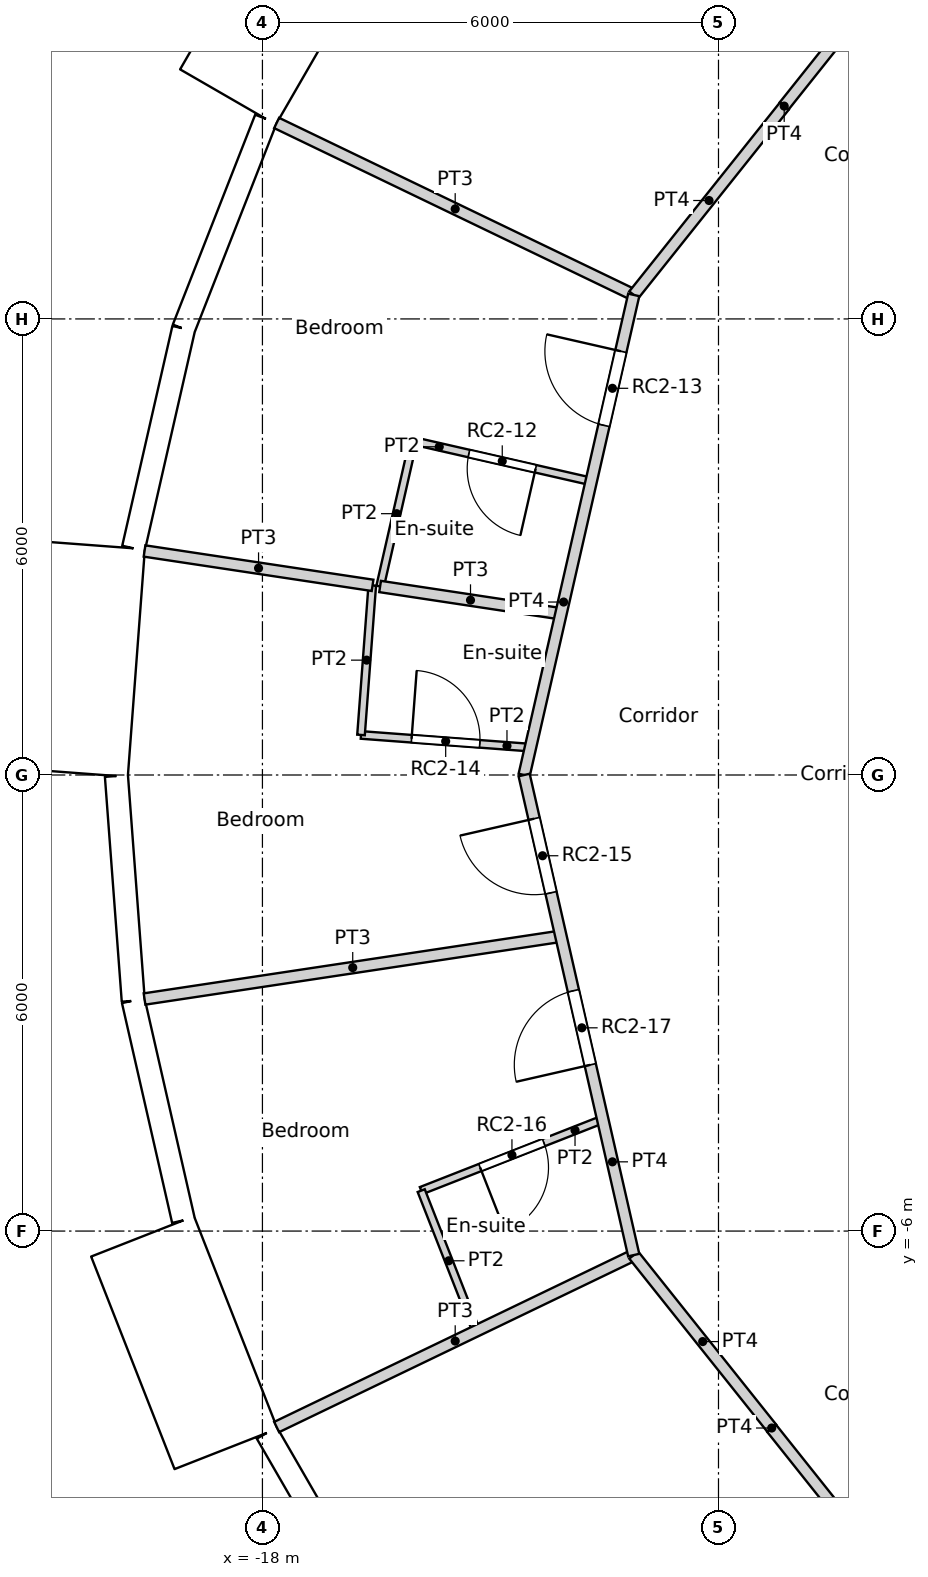
"""IFC4 building model, lengths in metres.
Left out: names, types, materials, properties, quantities, classifications, styles, units other than length and angle.
Written with IfcOpenShell. Run it as: python <this file> out.ifc"""

import sys

from ifc_helpers import new_model, si_unit, direction, frame, frame_2d, origin, origin_2d, place, context, subcontext, project, spatial, rectangle, circle, extrude, element, fill, save


model = new_model("IFC4")
c1 = context("Model", 3, precision=1e-05, world=origin(), true_north=direction((0.0, 1.0)))
c2 = subcontext(c1, "Body", "Model", "MODEL_VIEW")
j1 = project(units=[si_unit("LENGTHUNIT", "METRE"), si_unit("PLANEANGLEUNIT", "RADIAN")], contexts=[c1])
p1 = place(None, origin())
s1 = spatial("IfcSite", under=j1, at=p1, CompositionType="ELEMENT")
p2 = place(p1, origin())
s2 = spatial("IfcBuilding", under=s1, at=p2, CompositionType="ELEMENT")
p3 = place(p2, frame((0.0, 0.0, 241.8)))
s3 = spatial("IfcBuildingStorey", under=s2, at=p3, CompositionType="ELEMENT", Elevation=241.8)
for number, where, z_axis, x_axis in (
    (1, (-16.958, 8.167, 0.0), (0.0, 0.0, 1.0), (1.0, 0.0, 0.0)),
    (2, (-18.612, 2.805, 0.0), (0.0, 0.0, 1.0), (1.0, 0.0, 0.0)),
    (3, (-18.612, -2.805, 0.0), (0.0, 0.0, 1.0), (1.0, 0.0, 0.0)),
    (4, (-16.958, -8.167, 0.0), (0.0, 0.0, 1.0), (1.0, 0.0, 0.0)),
):
    element("IfcColumn", number, at=place(p3, frame(where, z_axis=z_axis, x_axis=x_axis)), inside=s3, PredefinedType="COLUMN", context=c2, shape_type="SweptSolid", body=[
        extrude(circle(Radius=0.55, at=origin_2d()), origin(), (0.0, 0.0, 1.0), 3.6),
    ])
p4 = place(p3, frame((-16.952, 11.52, -0.35), z_axis=(0.0, 0.0, 1.0), x_axis=(-0.499990139034, -0.866031096941, 0.0)))
e5 = element("IfcWall", 5, at=p4, inside=s3, PredefinedType="ELEMENTEDWALL", context=c2, shape_type="SweptSolid", body=[
    extrude(rectangle(XDim=3.0, YDim=1.45, at=frame_2d((1.5, 0.0))), origin(), (0.0, 0.0, 1.0), 3.6),
])
p5 = place(p4, frame((1.5, 0.0, 1.9)))
e6 = element("IfcOpeningElement", 6, at=p5, cuts=e5, PredefinedType="OPENING", context=c2, shape_type="SweptSolid", body=[
    extrude(circle(Radius=0.9, at=origin_2d()), frame((0.0, 0.735, 0.0), z_axis=(0.0, -1.0, 0.0), x_axis=(1.0, 0.0, 0.0)), (0.0, 0.0, 1.0), 1.47),
])
p6 = place(p3, frame((-17.955, 8.629, 0.0), z_axis=(0.0, 0.0, 1.0), x_axis=(-0.36530043032, -0.930889679612, 0.0)))
e7 = element("IfcWall", 7, at=p6, inside=s3, PredefinedType="SOLIDWALL", context=c2, shape_type="SweptSolid", body=[
    extrude(rectangle(XDim=2.962, YDim=0.3, at=frame_2d((1.481, 0.0))), origin(), (0.0, 0.0, 1.0), 3.25),
])
p7 = place(p6, frame((1.481, 0.0, 1.55)))
e8 = element("IfcOpeningElement", 8, at=p7, cuts=e7, PredefinedType="OPENING", context=c2, shape_type="SweptSolid", body=[
    extrude(circle(Radius=0.9, at=origin_2d()), frame((0.0, 0.16, 0.0), z_axis=(0.0, -1.0, 0.0), x_axis=(1.0, 0.0, 0.0)), (0.0, 0.0, 1.0), 0.32),
])
p8 = place(p3, frame((-19.037, 5.872, 0.0), z_axis=(0.0, 0.0, 1.0), x_axis=(-0.222529389789, -0.974925982155, 0.0)))
e9 = element("IfcWall", 9, at=p8, inside=s3, PredefinedType="SOLIDWALL", context=c2, shape_type="SweptSolid", body=[
    extrude(rectangle(XDim=2.962, YDim=0.3, at=frame_2d((1.481, 0.0))), origin(), (0.0, 0.0, 1.0), 3.25),
])
p9 = place(p8, frame((1.481, 0.0, 1.55)))
e10 = element("IfcOpeningElement", 10, at=p9, cuts=e9, PredefinedType="OPENING", context=c2, shape_type="SweptSolid", body=[
    extrude(circle(Radius=0.9, at=origin_2d()), frame((0.0, 0.16, 0.0), z_axis=(0.0, -1.0, 0.0), x_axis=(1.0, 0.0, 0.0)), (0.0, 0.0, 1.0), 0.32),
])
p10 = place(p3, frame((-20.272, 3.023, -0.35), z_axis=(0.0, 0.0, 1.0), x_axis=(-0.074785902127, -0.997199613339, 0.0)))
e11 = element("IfcWall", 11, at=p10, inside=s3, PredefinedType="ELEMENTEDWALL", context=c2, shape_type="SweptSolid", body=[
    extrude(rectangle(XDim=3.0, YDim=1.45, at=frame_2d((1.5, 0.0))), origin(), (0.0, 0.0, 1.0), 3.6),
])
p11 = place(p10, frame((1.5, 0.0, 1.9)))
e12 = element("IfcOpeningElement", 12, at=p11, cuts=e11, PredefinedType="OPENING", context=c2, shape_type="SweptSolid", body=[
    extrude(circle(Radius=0.9, at=origin_2d()), frame((0.0, 0.735, 0.0), z_axis=(0.0, -1.0, 0.0), x_axis=(1.0, 0.0, 0.0)), (0.0, 0.0, 1.0), 1.47),
])
p12 = place(p3, frame((-19.921, -0.015, 0.0), z_axis=(0.0, 0.0, 1.0), x_axis=(0.07474897196, -0.997202382263, 0.0)))
e13 = element("IfcWall", 13, at=p12, inside=s3, PredefinedType="SOLIDWALL", context=c2, shape_type="SweptSolid", body=[
    extrude(rectangle(XDim=2.962, YDim=0.3, at=frame_2d((1.481, 0.0))), origin(), (0.0, 0.0, 1.0), 3.25),
])
p13 = place(p12, frame((1.481, 0.0, 1.55)))
e14 = element("IfcOpeningElement", 14, at=p13, cuts=e13, PredefinedType="OPENING", context=c2, shape_type="SweptSolid", body=[
    extrude(circle(Radius=0.9, at=origin_2d()), frame((0.0, 0.16, 0.0), z_axis=(0.0, -1.0, 0.0), x_axis=(1.0, 0.0, 0.0)), (0.0, 0.0, 1.0), 0.32),
])
p14 = place(p3, frame((-19.699, -2.969, 0.0), z_axis=(0.0, 0.0, 1.0), x_axis=(0.222529389789, -0.974925982155, 0.0)))
e15 = element("IfcWall", 15, at=p14, inside=s3, PredefinedType="SOLIDWALL", context=c2, shape_type="SweptSolid", body=[
    extrude(rectangle(XDim=2.962, YDim=0.3, at=frame_2d((1.481, 0.0))), origin(), (0.0, 0.0, 1.0), 3.25),
])
p15 = place(p14, frame((1.481, 0.0, 1.55)))
e16 = element("IfcOpeningElement", 16, at=p15, cuts=e15, PredefinedType="OPENING", context=c2, shape_type="SweptSolid", body=[
    extrude(circle(Radius=0.9, at=origin_2d()), frame((0.0, 0.16, 0.0), z_axis=(0.0, -1.0, 0.0), x_axis=(1.0, 0.0, 0.0)), (0.0, 0.0, 1.0), 0.32),
])
p16 = place(p3, frame((-19.576, -6.072, -0.35), z_axis=(0.0, 0.0, 1.0), x_axis=(0.36537792632, -0.93085926485, 0.0)))
e17 = element("IfcWall", 17, at=p16, inside=s3, PredefinedType="ELEMENTEDWALL", context=c2, shape_type="SweptSolid", body=[
    extrude(rectangle(XDim=3.0, YDim=1.45, at=frame_2d((1.5, 0.0))), origin(), (0.0, 0.0, 1.0), 3.6),
])
p17 = place(p16, frame((1.5, 0.0, 1.9)))
e18 = element("IfcOpeningElement", 18, at=p17, cuts=e17, PredefinedType="OPENING", context=c2, shape_type="SweptSolid", body=[
    extrude(circle(Radius=0.9, at=origin_2d()), frame((0.0, 0.735, 0.0), z_axis=(0.0, -1.0, 0.0), x_axis=(1.0, 0.0, 0.0)), (0.0, 0.0, 1.0), 1.47),
])
p18 = place(p3, frame((-17.941, -8.657, 0.0), z_axis=(0.0, 0.0, 1.0), x_axis=(0.499950756475, -0.86605383268, 0.0)))
e19 = element("IfcWall", 19, at=p18, inside=s3, PredefinedType="SOLIDWALL", context=c2, shape_type="SweptSolid", body=[
    extrude(rectangle(XDim=2.962, YDim=0.3, at=frame_2d((1.481, 0.0))), origin(), (0.0, 0.0, 1.0), 3.25),
])
p19 = place(p18, frame((1.481, 0.0, 1.55)))
e20 = element("IfcOpeningElement", 20, at=p19, cuts=e19, PredefinedType="OPENING", context=c2, shape_type="SweptSolid", body=[
    extrude(circle(Radius=0.9, at=origin_2d()), frame((0.0, 0.16, 0.0), z_axis=(0.0, -1.0, 0.0), x_axis=(1.0, 0.0, 0.0)), (0.0, 0.0, 1.0), 0.32),
])
p20 = place(p3, frame((-11.134, 8.8, 0.0), z_axis=(0.0, 0.0, 1.0), x_axis=(-1.0, 0.0, 0.0)))
e21 = element("IfcWall", 21, at=p20, inside=s3, PredefinedType="PARTITIONING", context=c2, shape_type="SweptSolid", body=[
    extrude(rectangle(XDim=0.003, YDim=0.15, at=frame_2d((0.001, 0.0))), origin(), (0.0, 0.0, 1.0), 3.25),
])
p21 = place(p3, frame((-11.136, 8.802, 0.0), z_axis=(0.0, 0.0, 1.0), x_axis=(0.623151397235, 0.782101231379, 0.0)))
e22 = element("IfcWall", 22, at=p21, inside=s3, PredefinedType="PARTITIONING", context=c2, shape_type="SweptSolid", body=[
    extrude(rectangle(XDim=3.301, YDim=0.15, at=frame_2d((1.65, 0.0))), origin(), (0.0, 0.0, 1.0), 3.25),
])
p22 = place(p3, frame((-11.3, -8.596, 0.0), z_axis=(0.0, 0.0, 1.0), x_axis=(0.623165080354, -0.782090328944, 0.0)))
e23 = element("IfcWall", 23, at=p22, inside=s3, PredefinedType="PARTITIONING", context=c2, shape_type="SweptSolid", body=[
    extrude(rectangle(XDim=3.564, YDim=0.15, at=frame_2d((1.782, 0.0))), origin(), (0.0, 0.0, 1.0), 3.25),
])
p23 = place(p3, frame((-11.3, -8.596, 0.0), z_axis=(0.0, 0.0, 1.0), x_axis=(0.0, 1.0, 0.0)))
e24 = element("IfcWall", 24, at=p23, inside=s3, PredefinedType="PARTITIONING", context=c2, shape_type="SweptSolid", body=[
    extrude(rectangle(XDim=0.01, YDim=0.15, at=frame_2d((0.005, 0.0))), origin(), (0.0, 0.0, 1.0), 3.25),
])
p24 = place(p3, frame((-13.115, 6.316, 0.0), z_axis=(0.0, 0.0, 1.0), x_axis=(0.623476099415, 0.781842409606, 0.0)))
e25 = element("IfcWall", 25, at=p24, inside=s3, PredefinedType="PARTITIONING", context=c2, shape_type="SweptSolid", body=[
    extrude(rectangle(XDim=3.177, YDim=0.15, at=frame_2d((1.589, 0.0))), origin(), (0.0, 0.0, 1.0), 3.25),
])
p25 = place(p3, frame((-14.557, 0.0, 0.0), z_axis=(0.0, 0.0, 1.0), x_axis=(0.222533159771, 0.974925121639, 0.0)))
e26 = element("IfcWall", 26, at=p25, inside=s3, PredefinedType="PARTITIONING", context=c2, shape_type="SweptSolid", body=[
    extrude(rectangle(XDim=6.478, YDim=0.15, at=frame_2d((3.239, 0.0))), origin(), (0.0, 0.0, 1.0), 3.25),
])
p26 = place(p25, frame((4.718, 0.0, 0.0)))
e27 = element("IfcOpeningElement", 27, at=p26, cuts=e26, PredefinedType="OPENING", context=c2, shape_type="SweptSolid", body=[
    extrude(rectangle(XDim=1.0, YDim=2.1, at=frame_2d((0.5, 1.05))), frame((0.0, 0.075, 0.0), z_axis=(0.0, -1.0, 0.0), x_axis=(1.0, 0.0, 0.0)), (0.0, 0.0, 1.0), 0.15),
])
p27 = place(p3, frame((-14.557, 0.0, 0.0), z_axis=(0.0, 0.0, 1.0), x_axis=(0.222489165471, -0.974935162587, 0.0)))
e28 = element("IfcWall", 28, at=p27, inside=s3, PredefinedType="PARTITIONING", context=c2, shape_type="SweptSolid", body=[
    extrude(rectangle(XDim=6.479, YDim=0.15, at=frame_2d((3.239, 0.0))), origin(), (0.0, 0.0, 1.0), 3.25),
])
p28 = place(p27, frame((0.59, 0.0, 0.0)))
e29 = element("IfcOpeningElement", 29, at=p28, cuts=e28, PredefinedType="OPENING", context=c2, shape_type="SweptSolid", body=[
    extrude(rectangle(XDim=1.0, YDim=2.1, at=frame_2d((0.5, 1.05))), frame((0.0, 0.075, 0.0), z_axis=(0.0, -1.0, 0.0), x_axis=(1.0, 0.0, 0.0)), (0.0, 0.0, 1.0), 0.15),
])
p29 = place(p27, frame((2.912, 0.0, 0.0)))
e30 = element("IfcOpeningElement", 30, at=p29, cuts=e28, PredefinedType="OPENING", context=c2, shape_type="SweptSolid", body=[
    extrude(rectangle(XDim=1.0, YDim=2.1, at=frame_2d((0.5, 1.05))), frame((0.0, 0.075, 0.0), z_axis=(0.0, -1.0, 0.0), x_axis=(1.0, 0.0, 0.0)), (0.0, 0.0, 1.0), 0.15),
])
p30 = place(p3, frame((-13.115, -6.316, 0.0), z_axis=(0.0, 0.0, 1.0), x_axis=(0.623446514299, -0.781866001185, 0.0)))
e31 = element("IfcWall", 31, at=p30, inside=s3, PredefinedType="PARTITIONING", context=c2, shape_type="SweptSolid", body=[
    extrude(rectangle(XDim=2.911, YDim=0.15, at=frame_2d((1.456, 0.0))), origin(), (0.0, 0.0, 1.0), 3.25),
])
p31 = place(p3, frame((-17.813, 8.578, 0.0), z_axis=(0.0, 0.0, 1.0), x_axis=(0.901004381064, -0.433809987557, 0.0)))
e32 = element("IfcWall", 32, at=p31, inside=s3, PredefinedType="PARTITIONING", context=c2, shape_type="SweptSolid", body=[
    extrude(rectangle(XDim=5.214, YDim=0.15, at=frame_2d((2.607, 0.0))), origin(), (0.0, 0.0, 1.0), 3.25),
])
p32 = place(p3, frame((-16.015, 4.396, 0.0), z_axis=(0.0, 0.0, 1.0), x_axis=(0.97493862442, -0.222473995368, 0.0)))
e33 = element("IfcWall", 33, at=p32, inside=s3, PredefinedType="PARTITIONING", context=c2, shape_type="SweptSolid", body=[
    extrude(rectangle(XDim=2.4, YDim=0.1, at=frame_2d((1.2, 0.0))), origin(), (0.0, 0.0, 1.0), 3.25),
])
p33 = place(p32, frame((0.75, 0.0, 0.0)))
e34 = element("IfcOpeningElement", 34, at=p33, cuts=e33, PredefinedType="OPENING", context=c2, shape_type="SweptSolid", body=[
    extrude(rectangle(XDim=0.9, YDim=2.04, at=frame_2d((0.45, 1.02))), frame((0.0, 0.05, 0.0), z_axis=(0.0, -1.0, 0.0), x_axis=(1.0, 0.0, 0.0)), (0.0, 0.0, 1.0), 0.1),
])
p34 = place(p3, frame((-16.452, 2.48, 0.0), z_axis=(0.0, 0.0, 1.0), x_axis=(0.22237276708, 0.974961718459, 0.0)))
e35 = element("IfcWall", 35, at=p34, inside=s3, PredefinedType="PARTITIONING", context=c2, shape_type="SweptSolid", body=[
    extrude(rectangle(XDim=1.965, YDim=0.1, at=frame_2d((0.983, 0.0))), origin(), (0.0, 0.0, 1.0), 3.25),
])
p35 = place(p3, frame((-19.551, 2.947, 0.0), z_axis=(0.0, 0.0, 1.0), x_axis=(0.988844081525, -0.14895429646, 0.0)))
e36 = element("IfcWall", 36, at=p35, inside=s3, PredefinedType="PARTITIONING", context=c2, shape_type="SweptSolid", body=[
    extrude(rectangle(XDim=3.034, YDim=0.15, at=frame_2d((1.517, 0.0))), origin(), (0.0, 0.0, 1.0), 3.25),
])
p36 = place(p3, frame((-16.452, 2.48, 0.0), z_axis=(0.0, 0.0, 1.0), x_axis=(0.988810951618, -0.149174065977, 0.0)))
e37 = element("IfcWall", 37, at=p36, inside=s3, PredefinedType="PARTITIONING", context=c2, shape_type="SweptSolid", body=[
    extrude(rectangle(XDim=2.406, YDim=0.15, at=frame_2d((1.203, 0.0))), origin(), (0.0, 0.0, 1.0), 3.25),
])
p37 = place(p3, frame((-16.703, 0.527, 0.0), z_axis=(0.0, 0.0, 1.0), x_axis=(0.07496524071, 0.99718614746, 0.0)))
e38 = element("IfcWall", 38, at=p37, inside=s3, PredefinedType="PARTITIONING", context=c2, shape_type="SweptSolid", body=[
    extrude(rectangle(XDim=1.974, YDim=0.1, at=frame_2d((0.987, 0.0))), origin(), (0.0, 0.0, 1.0), 3.25),
])
p38 = place(p3, frame((-16.703, 0.527, 0.0), z_axis=(0.0, 0.0, 1.0), x_axis=(0.997202365433, -0.074749196488, 0.0)))
e39 = element("IfcWall", 39, at=p38, inside=s3, PredefinedType="PARTITIONING", context=c2, shape_type="SweptSolid", body=[
    extrude(rectangle(XDim=2.234, YDim=0.1, at=frame_2d((1.117, 0.0))), origin(), (0.0, 0.0, 1.0), 3.25),
])
p39 = place(p38, frame((0.667, 0.0, 0.0)))
e40 = element("IfcOpeningElement", 40, at=p39, cuts=e39, PredefinedType="OPENING", context=c2, shape_type="SweptSolid", body=[
    extrude(rectangle(XDim=0.9, YDim=2.04, at=frame_2d((0.45, 1.02))), frame((0.0, 0.05, 0.0), z_axis=(0.0, -1.0, 0.0), x_axis=(1.0, 0.0, 0.0)), (0.0, 0.0, 1.0), 0.1),
])
p40 = place(p3, frame((-19.551, -2.947, 0.0), z_axis=(0.0, 0.0, 1.0), x_axis=(0.988824228734, 0.149086031099, 0.0)))
e41 = element("IfcWall", 41, at=p40, inside=s3, PredefinedType="PARTITIONING", context=c2, shape_type="SweptSolid", body=[
    extrude(rectangle(XDim=5.54, YDim=0.15, at=frame_2d((2.77, 0.0))), origin(), (0.0, 0.0, 1.0), 3.25),
])
p41 = place(p3, frame((-15.911, -5.468, 0.0), z_axis=(0.0, 0.0, 1.0), x_axis=(0.930898333543, 0.365278376867, 0.0)))
e42 = element("IfcWall", 42, at=p41, inside=s3, PredefinedType="PARTITIONING", context=c2, shape_type="SweptSolid", body=[
    extrude(rectangle(XDim=2.565, YDim=0.1, at=frame_2d((1.283, 0.0))), origin(), (0.0, 0.0, 1.0), 3.25),
])
p42 = place(p41, frame((0.832, 0.0, 0.0)))
e43 = element("IfcOpeningElement", 43, at=p42, cuts=e42, PredefinedType="OPENING", context=c2, shape_type="SweptSolid", body=[
    extrude(rectangle(XDim=0.9, YDim=2.04, at=frame_2d((0.45, 1.02))), frame((0.0, 0.05, 0.0), z_axis=(0.0, -1.0, 0.0), x_axis=(1.0, 0.0, 0.0)), (0.0, 0.0, 1.0), 0.1),
])
p43 = place(p3, frame((-15.911, -5.468, 0.0), z_axis=(0.0, 0.0, 1.0), x_axis=(0.36507706633, -0.930977301356, 0.0)))
e44 = element("IfcWall", 44, at=p43, inside=s3, PredefinedType="PARTITIONING", context=c2, shape_type="SweptSolid", body=[
    extrude(rectangle(XDim=1.983, YDim=0.1, at=frame_2d((0.991, 0.0))), origin(), (0.0, 0.0, 1.0), 3.25),
])
p44 = place(p3, frame((-17.813, -8.578, 0.0), z_axis=(0.0, 0.0, 1.0), x_axis=(0.901049790108, 0.433715662325, 0.0)))
e45 = element("IfcWall", 45, at=p44, inside=s3, PredefinedType="PARTITIONING", context=c2, shape_type="SweptSolid", body=[
    extrude(rectangle(XDim=5.214, YDim=0.15, at=frame_2d((2.607, 0.0))), origin(), (0.0, 0.0, 1.0), 3.25),
])
p45 = place(p5, origin())
e46 = element("IfcWindow", 46, at=p45, inside=s3, PartitioningType="SINGLE_PANEL", PredefinedType="WINDOW", context=c2, shape_type="SweptSolid", body=[
    extrude(circle(Radius=0.9, at=origin_2d()), frame((0.0, 0.695, 0.0), z_axis=(0.0, -1.0, 0.0), x_axis=(1.0, 0.0, 0.0)), (0.0, 0.0, 1.0), 0.1),
])
fill(e6, e46)
p46 = place(p7, origin())
e47 = element("IfcWindow", 47, at=p46, inside=s3, PartitioningType="SINGLE_PANEL", PredefinedType="WINDOW", context=c2, shape_type="SweptSolid", body=[
    extrude(circle(Radius=0.9, at=origin_2d()), frame((0.0, 0.12, 0.0), z_axis=(0.0, -1.0, 0.0), x_axis=(1.0, 0.0, 0.0)), (0.0, 0.0, 1.0), 0.1),
])
fill(e8, e47)
p47 = place(p9, origin())
e48 = element("IfcWindow", 48, at=p47, inside=s3, PartitioningType="SINGLE_PANEL", PredefinedType="WINDOW", context=c2, shape_type="SweptSolid", body=[
    extrude(circle(Radius=0.9, at=origin_2d()), frame((0.0, 0.12, 0.0), z_axis=(0.0, -1.0, 0.0), x_axis=(1.0, 0.0, 0.0)), (0.0, 0.0, 1.0), 0.1),
])
fill(e10, e48)
p48 = place(p11, origin())
e49 = element("IfcWindow", 49, at=p48, inside=s3, PartitioningType="SINGLE_PANEL", PredefinedType="WINDOW", context=c2, shape_type="SweptSolid", body=[
    extrude(circle(Radius=0.9, at=origin_2d()), frame((0.0, 0.695, 0.0), z_axis=(0.0, -1.0, 0.0), x_axis=(1.0, 0.0, 0.0)), (0.0, 0.0, 1.0), 0.1),
])
fill(e12, e49)
p49 = place(p13, origin())
e50 = element("IfcWindow", 50, at=p49, inside=s3, PartitioningType="SINGLE_PANEL", PredefinedType="WINDOW", context=c2, shape_type="SweptSolid", body=[
    extrude(circle(Radius=0.9, at=origin_2d()), frame((0.0, 0.12, 0.0), z_axis=(0.0, -1.0, 0.0), x_axis=(1.0, 0.0, 0.0)), (0.0, 0.0, 1.0), 0.1),
])
fill(e14, e50)
p50 = place(p15, origin())
e51 = element("IfcWindow", 51, at=p50, inside=s3, PartitioningType="SINGLE_PANEL", PredefinedType="WINDOW", context=c2, shape_type="SweptSolid", body=[
    extrude(circle(Radius=0.9, at=origin_2d()), frame((0.0, 0.12, 0.0), z_axis=(0.0, -1.0, 0.0), x_axis=(1.0, 0.0, 0.0)), (0.0, 0.0, 1.0), 0.1),
])
fill(e16, e51)
p51 = place(p17, origin())
e52 = element("IfcWindow", 52, at=p51, inside=s3, PartitioningType="SINGLE_PANEL", PredefinedType="WINDOW", context=c2, shape_type="SweptSolid", body=[
    extrude(circle(Radius=0.9, at=origin_2d()), frame((0.0, 0.695, 0.0), z_axis=(0.0, -1.0, 0.0), x_axis=(1.0, 0.0, 0.0)), (0.0, 0.0, 1.0), 0.1),
])
fill(e18, e52)
p52 = place(p19, origin())
e53 = element("IfcWindow", 53, at=p52, inside=s3, PartitioningType="SINGLE_PANEL", PredefinedType="WINDOW", context=c2, shape_type="SweptSolid", body=[
    extrude(circle(Radius=0.9, at=origin_2d()), frame((0.0, 0.12, 0.0), z_axis=(0.0, -1.0, 0.0), x_axis=(1.0, 0.0, 0.0)), (0.0, 0.0, 1.0), 0.1),
])
fill(e20, e53)
p53 = place(p33, origin())
e54 = element("IfcDoor", 54, at=p53, inside=s3, OperationType="SINGLE_SWING_LEFT", PredefinedType="DOOR", context=c2, shape_type="SweptSolid", body=[
    extrude(rectangle(XDim=0.9, YDim=2.04, at=frame_2d((0.45, 1.02))), frame((0.0, 0.025, 0.0), z_axis=(0.0, -1.0, 0.0), x_axis=(1.0, 0.0, 0.0)), (0.0, 0.0, 1.0), 0.05),
])
fill(e34, e54)
p54 = place(p26, origin())
e55 = element("IfcDoor", 55, at=p54, inside=s3, OperationType="SINGLE_SWING_RIGHT", PredefinedType="DOOR", context=c2, shape_type="SweptSolid", body=[
    extrude(rectangle(XDim=1.0, YDim=2.1, at=frame_2d((0.5, 1.05))), frame((0.0, 0.025, 0.0), z_axis=(0.0, -1.0, 0.0), x_axis=(1.0, 0.0, 0.0)), (0.0, 0.0, 1.0), 0.05),
])
fill(e27, e55)
p55 = place(p39, origin())
e56 = element("IfcDoor", 56, at=p55, inside=s3, OperationType="SINGLE_SWING_LEFT", PredefinedType="DOOR", context=c2, shape_type="SweptSolid", body=[
    extrude(rectangle(XDim=0.9, YDim=2.04, at=frame_2d((0.45, 1.02))), frame((0.0, 0.025, 0.0), z_axis=(0.0, -1.0, 0.0), x_axis=(1.0, 0.0, 0.0)), (0.0, 0.0, 1.0), 0.05),
])
fill(e40, e56)
p56 = place(p28, origin())
e57 = element("IfcDoor", 57, at=p56, inside=s3, OperationType="SINGLE_SWING_RIGHT", PredefinedType="DOOR", context=c2, shape_type="SweptSolid", body=[
    extrude(rectangle(XDim=1.0, YDim=2.1, at=frame_2d((0.5, 1.05))), frame((0.0, 0.025, 0.0), z_axis=(0.0, -1.0, 0.0), x_axis=(1.0, 0.0, 0.0)), (0.0, 0.0, 1.0), 0.05),
])
fill(e29, e57)
p57 = place(p42, origin())
e58 = element("IfcDoor", 58, at=p57, inside=s3, OperationType="SINGLE_SWING_RIGHT", PredefinedType="DOOR", context=c2, shape_type="SweptSolid", body=[
    extrude(rectangle(XDim=0.9, YDim=2.04, at=frame_2d((0.45, 1.02))), frame((0.0, 0.025, 0.0), z_axis=(0.0, -1.0, 0.0), x_axis=(1.0, 0.0, 0.0)), (0.0, 0.0, 1.0), 0.05),
])
fill(e43, e58)
p58 = place(p29, origin())
e59 = element("IfcDoor", 59, at=p58, inside=s3, OperationType="SINGLE_SWING_LEFT", PredefinedType="DOOR", context=c2, shape_type="SweptSolid", body=[
    extrude(rectangle(XDim=1.0, YDim=2.1, at=frame_2d((0.5, 1.05))), frame((0.0, 0.025, 0.0), z_axis=(0.0, -1.0, 0.0), x_axis=(1.0, 0.0, 0.0)), (0.0, 0.0, 1.0), 0.05),
])
fill(e30, e59)
save(model, sys.argv[1])
